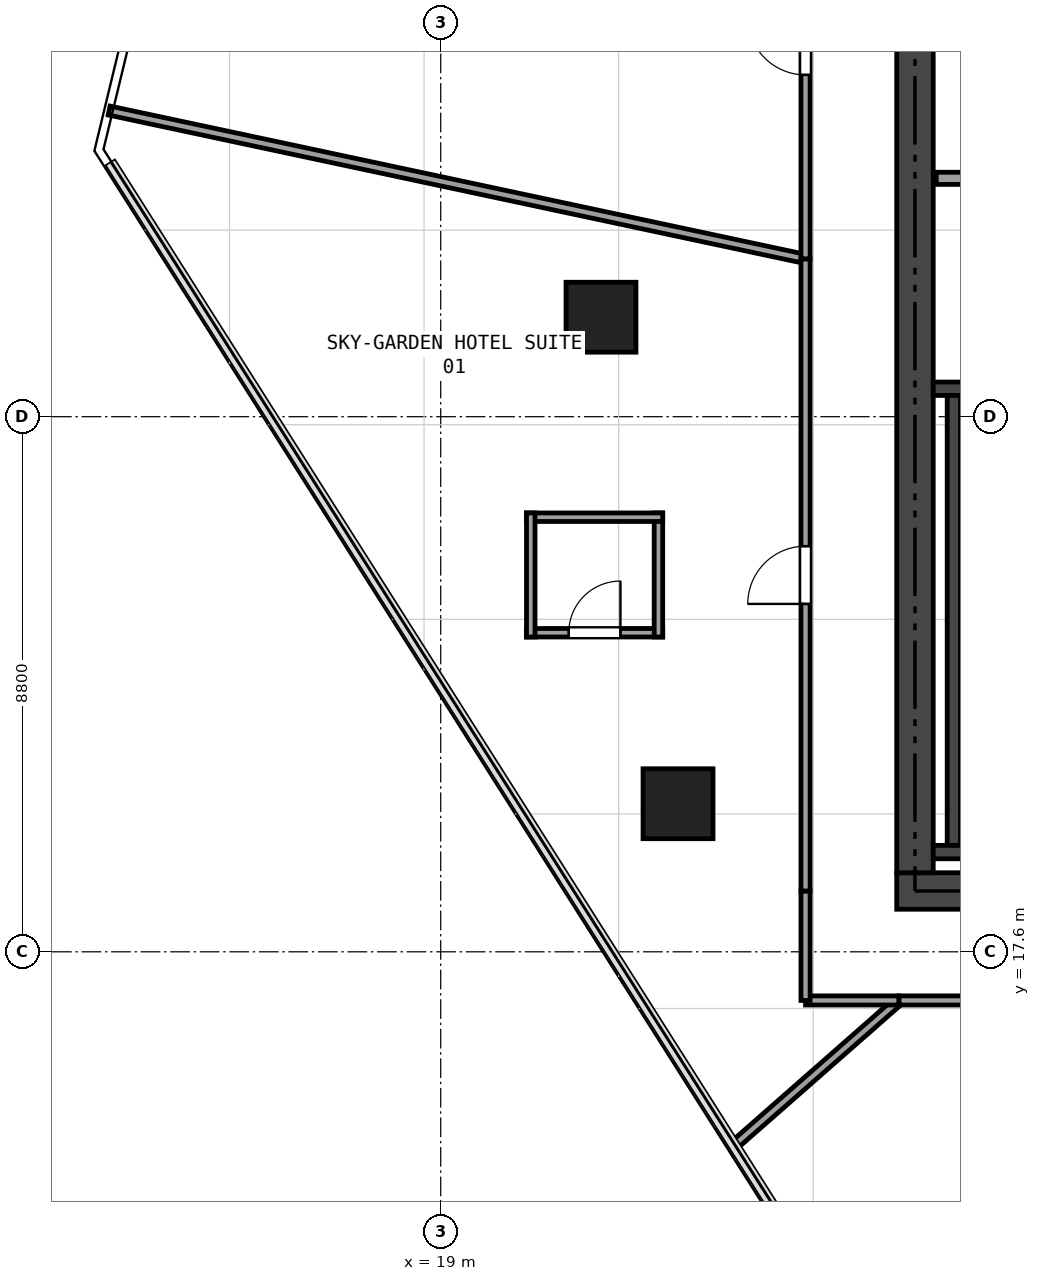
"""IFC4 building model, lengths in metres.
Left out: names, types, materials, properties, quantities, classifications, styles, units other than length and angle.
Written with IfcOpenShell. Run it as: python <this file> out.ifc"""

import sys

from ifc_helpers import new_model, si_unit, direction, frame, frame_2d, origin, origin_2d, place, context, subcontext, project, spatial, rectangle, extrude, element, fill, save


model = new_model("IFC4")
c1 = context("Model", 3, precision=1e-05, world=origin(), true_north=direction((0.0, 1.0)))
c2 = subcontext(c1, "Body", "Model", "MODEL_VIEW")
j1 = project(units=[si_unit("LENGTHUNIT", "METRE"), si_unit("PLANEANGLEUNIT", "RADIAN")], contexts=[c1])
p1 = place(None, origin())
s1 = spatial("IfcSite", under=j1, at=p1, CompositionType="ELEMENT")
p2 = place(p1, origin())
s2 = spatial("IfcBuilding", under=s1, at=p2, CompositionType="ELEMENT")
p3 = place(p2, frame((0.0, 0.0, 76.35)))
s3 = spatial("IfcBuildingStorey", under=s2, at=p3, CompositionType="ELEMENT", Elevation=76.35)
p4 = place(p3, frame((26.5, 18.6, 0.0), z_axis=(0.0, 0.0, 1.0), x_axis=(1.0, 0.0, 0.0)))
e1 = element("IfcWall", 1, at=p4, inside=s3, PredefinedType="SHEAR", context=c2, shape_type="SweptSolid", body=[
    extrude(rectangle(XDim=21.4, YDim=0.6, at=frame_2d((10.7, 0.0))), origin(), (0.0, 0.0, 1.0), 3.17),
])
p5 = place(p4, frame((12.425, 0.0, 0.0)))
e2 = element("IfcOpeningElement", 2, at=p5, cuts=e1, PredefinedType="OPENING", context=c2, shape_type="SweptSolid", body=[
    extrude(rectangle(XDim=1.15, YDim=2.15, at=frame_2d((0.575, 1.075))), frame((0.0, 0.31, 0.0), z_axis=(0.0, -1.0, 0.0), x_axis=(1.0, 0.0, 0.0)), (0.0, 0.0, 1.0), 0.62),
])
p6 = place(p4, frame((5.25, 0.0, 0.0)))
e3 = element("IfcOpeningElement", 3, at=p6, cuts=e1, PredefinedType="OPENING", context=c2, shape_type="SweptSolid", body=[
    extrude(rectangle(XDim=0.9, YDim=2.1, at=frame_2d((0.45, 1.05))), frame((0.0, 0.31, 0.0), z_axis=(0.0, -1.0, 0.0), x_axis=(1.0, 0.0, 0.0)), (0.0, 0.0, 1.0), 0.62),
])
p7 = place(p3, frame((26.8, 18.9, 0.0), z_axis=(0.0, 0.0, 1.0), x_axis=(0.0, 1.0, 0.0)))
e4 = element("IfcWall", 4, at=p7, inside=s3, PredefinedType="SHEAR", context=c2, shape_type="SweptSolid", body=[
    extrude(rectangle(XDim=15.0, YDim=0.6, at=frame_2d((7.5, 0.0))), origin(), (0.0, 0.0, 1.0), 3.17),
])
p8 = place(p3, frame((27.1, 26.86, 0.0), z_axis=(0.0, 0.0, 1.0), x_axis=(1.0, 0.0, 0.0)))
e5 = element("IfcWall", 5, at=p8, inside=s3, PredefinedType="SHEAR", context=c2, shape_type="SweptSolid", body=[
    extrude(rectangle(XDim=3.45, YDim=0.22, at=frame_2d((1.725, 0.0))), origin(), (0.0, 0.0, 1.0), 3.17),
])
p9 = place(p3, frame((27.44, 19.35, 0.0), z_axis=(0.0, 0.0, 1.0), x_axis=(0.0, 1.0, 0.0)))
e6 = element("IfcWall", 6, at=p9, inside=s3, PredefinedType="SHEAR", context=c2, shape_type="SweptSolid", body=[
    extrude(rectangle(XDim=7.4, YDim=0.22, at=frame_2d((3.7, 0.0))), origin(), (0.0, 0.0, 1.0), 3.17),
])
p10 = place(p3, frame((27.1, 19.24, 0.0), z_axis=(0.0, 0.0, 1.0), x_axis=(1.0, 0.0, 0.0)))
e7 = element("IfcWall", 7, at=p10, inside=s3, PredefinedType="SHEAR", context=c2, shape_type="SweptSolid", body=[
    extrude(rectangle(XDim=3.45, YDim=0.22, at=frame_2d((1.725, 0.0))), origin(), (0.0, 0.0, 1.0), 3.17),
])
for number, where, z_axis, x_axis in (
    (8, (21.636, 28.036, -0.405), (0.0, 0.0, 1.0), (1.0, 0.0, 0.0)),
    (9, (22.903, 20.035, -0.405), (0.0, 0.0, 1.0), (1.0, 0.0, 0.0)),
):
    element("IfcColumn", number, at=place(p3, frame(where, z_axis=z_axis, x_axis=x_axis)), inside=s3, PredefinedType="COLUMN", context=c2, shape_type="SweptSolid", body=[
        extrude(rectangle(XDim=1.15, YDim=1.15, at=origin_2d()), origin(), (0.0, 0.0, 1.0), 3.575),
    ])
p11 = place(p3, frame((27.15, 30.32, 0.0), z_axis=(0.0, 0.0, 1.0), x_axis=(1.0, 0.0, 0.0)))
e10 = element("IfcWall", 10, at=p11, inside=s3, PredefinedType="SOLIDWALL", context=c2, shape_type="SweptSolid", body=[
    extrude(rectangle(XDim=3.45, YDim=0.2, at=frame_2d((1.725, 0.0))), origin(), (0.0, 0.0, 1.0), 3.17),
])
p12 = place(p3, frame((20.411, 22.847, 0.0), z_axis=(0.0, 0.0, 1.0), x_axis=(1.0, 0.0, 0.0)))
e11 = element("IfcWall", 11, at=p12, inside=s3, PredefinedType="PARTITIONING", context=c2, shape_type="SweptSolid", body=[
    extrude(rectangle(XDim=2.24, YDim=0.14, at=frame_2d((1.12, 0.0))), origin(), (0.0, 0.0, 1.0), 2.455),
])
p13 = place(p12, frame((0.695, 0.0, 0.0)))
e12 = element("IfcOpeningElement", 12, at=p13, cuts=e11, PredefinedType="OPENING", context=c2, shape_type="SweptSolid", body=[
    extrude(rectangle(XDim=0.85, YDim=2.1, at=frame_2d((0.425, 1.05))), frame((0.0, 0.08, 0.0), z_axis=(0.0, -1.0, 0.0), x_axis=(1.0, 0.0, 0.0)), (0.0, 0.0, 1.0), 0.16),
])
p14 = place(p3, frame((22.581, 22.777, 0.0), z_axis=(0.0, 0.0, 1.0), x_axis=(0.0, 1.0, 0.0)))
e13 = element("IfcWall", 13, at=p14, inside=s3, PredefinedType="PARTITIONING", context=c2, shape_type="SweptSolid", body=[
    extrude(rectangle(XDim=2.04, YDim=0.14, at=frame_2d((1.02, 0.0))), origin(), (0.0, 0.0, 1.0), 2.455),
])
p15 = place(p3, frame((22.651, 24.747, 0.0), z_axis=(0.0, 0.0, 1.0), x_axis=(-1.0, 0.0, 0.0)))
e14 = element("IfcWall", 14, at=p15, inside=s3, PredefinedType="PARTITIONING", context=c2, shape_type="SweptSolid", body=[
    extrude(rectangle(XDim=2.24, YDim=0.14, at=frame_2d((1.12, 0.0))), origin(), (0.0, 0.0, 1.0), 2.455),
])
p16 = place(p3, frame((20.481, 24.817, 0.0), z_axis=(0.0, 0.0, 1.0), x_axis=(0.0, -1.0, 0.0)))
e15 = element("IfcWall", 15, at=p16, inside=s3, PredefinedType="PARTITIONING", context=c2, shape_type="SweptSolid", body=[
    extrude(rectangle(XDim=2.04, YDim=0.14, at=frame_2d((1.02, 0.0))), origin(), (0.0, 0.0, 1.0), 3.17),
])
p17 = place(p3, frame((13.547, 31.435, 0.0), z_axis=(0.0, 0.0, 1.0), x_axis=(0.978012740802, -0.208545148179, 0.0)))
e16 = element("IfcWall", 16, at=p17, inside=s3, PredefinedType="PARTITIONING", context=c2, shape_type="SweptSolid", body=[
    extrude(rectangle(XDim=11.71, YDim=0.15, at=frame_2d((5.855, 0.0))), origin(), (0.0, 0.0, 1.0), 2.455),
])
p18 = place(p3, frame((25.0, 28.993, 0.0), z_axis=(0.0, 0.0, 1.0), x_axis=(0.0, 1.0, 0.0)))
e17 = element("IfcWall", 17, at=p18, inside=s3, PredefinedType="PARTITIONING", context=c2, shape_type="SweptSolid", body=[
    extrude(rectangle(XDim=7.007, YDim=0.15, at=frame_2d((3.503, 0.0))), origin(), (0.0, 0.0, 1.0), 2.455),
])
p19 = place(p18, frame((3.028, 0.0, 0.0)))
e18 = element("IfcOpeningElement", 18, at=p19, cuts=e17, PredefinedType="OPENING", context=c2, shape_type="SweptSolid", body=[
    extrude(rectangle(XDim=0.95, YDim=2.15, at=frame_2d((0.475, 1.075))), frame((0.0, 0.085, 0.0), z_axis=(0.0, -1.0, 0.0), x_axis=(1.0, 0.0, 0.0)), (0.0, 0.0, 1.0), 0.17),
])
p20 = place(p3, frame((23.793, 14.391, 0.0), z_axis=(0.0, 0.0, 1.0), x_axis=(0.751631776081, 0.659582953983, 0.0)))
e19 = element("IfcWall", 19, at=p20, inside=s3, PredefinedType="PARTITIONING", context=c2, shape_type="SweptSolid", body=[
    extrude(rectangle(XDim=3.652, YDim=0.15, at=frame_2d((1.826, 0.0))), origin(), (0.0, 0.0, 1.0), 2.455),
])
p21 = place(p3, frame((26.538, 16.8, 0.0), z_axis=(0.0, 0.0, 1.0), x_axis=(-1.0, 0.0, 0.0)))
e20 = element("IfcWall", 20, at=p21, inside=s3, PredefinedType="PARTITIONING", context=c2, shape_type="SweptSolid", body=[
    extrude(rectangle(XDim=1.538, YDim=0.15, at=frame_2d((0.769, 0.0))), origin(), (0.0, 0.0, 1.0), 2.455),
])
p22 = place(p3, frame((25.0, 16.8, 0.0), z_axis=(0.0, 0.0, 1.0), x_axis=(0.0, 1.0, 0.0)))
e21 = element("IfcWall", 21, at=p22, inside=s3, PredefinedType="PARTITIONING", context=c2, shape_type="SweptSolid", body=[
    extrude(rectangle(XDim=1.8, YDim=0.15, at=frame_2d((0.9, 0.0))), origin(), (0.0, 0.0, 1.0), 2.455),
])
p23 = place(p3, frame((25.0, 18.6, 0.0), z_axis=(0.0, 0.0, 1.0), x_axis=(0.0, 1.0, 0.0)))
e22 = element("IfcWall", 22, at=p23, inside=s3, PredefinedType="PARTITIONING", context=c2, shape_type="SweptSolid", body=[
    extrude(rectangle(XDim=10.393, YDim=0.15, at=frame_2d((5.196, 0.0))), origin(), (0.0, 0.0, 1.0), 2.467),
])
p24 = place(p23, frame((4.721, 0.0, 0.0)))
e23 = element("IfcOpeningElement", 23, at=p24, cuts=e22, PredefinedType="OPENING", context=c2, shape_type="SweptSolid", body=[
    extrude(rectangle(XDim=0.95, YDim=2.15, at=frame_2d((0.475, 1.075))), frame((0.0, 0.085, 0.0), z_axis=(0.0, -1.0, 0.0), x_axis=(1.0, 0.0, 0.0)), (0.0, 0.0, 1.0), 0.17),
])
p25 = place(p3, frame((38.209, 16.8, 0.0), z_axis=(0.0, 0.0, 1.0), x_axis=(-1.0, 0.0, 0.0)))
e24 = element("IfcWall", 24, at=p25, inside=s3, PredefinedType="PARTITIONING", context=c2, shape_type="SweptSolid", body=[
    extrude(rectangle(XDim=11.671, YDim=0.15, at=frame_2d((5.835, 0.0))), origin(), (0.0, 0.0, 1.0), 2.455),
])
p26 = place(p25, frame((5.361, 0.0, 0.0)))
e25 = element("IfcOpeningElement", 25, at=p26, cuts=e24, PredefinedType="OPENING", context=c2, shape_type="SweptSolid", body=[
    extrude(rectangle(XDim=0.95, YDim=2.15, at=frame_2d((0.475, 1.075))), frame((0.0, 0.085, 0.0), z_axis=(0.0, -1.0, 0.0), x_axis=(1.0, 0.0, 0.0)), (0.0, 0.0, 1.0), 0.17),
])
p27 = place(p19, origin())
e26 = element("IfcDoor", 26, at=p27, inside=s3, OperationType="SINGLE_SWING_RIGHT", PredefinedType="DOOR", context=c2, shape_type="SweptSolid", body=[
    extrude(rectangle(XDim=0.95, YDim=2.15, at=frame_2d((0.475, 1.075))), frame((0.0, 0.025, 0.0), z_axis=(0.0, -1.0, 0.0), x_axis=(1.0, 0.0, 0.0)), (0.0, 0.0, 1.0), 0.05),
])
fill(e18, e26)
p28 = place(p24, origin())
e27 = element("IfcDoor", 27, at=p28, inside=s3, OperationType="SINGLE_SWING_LEFT", PredefinedType="DOOR", context=c2, shape_type="SweptSolid", body=[
    extrude(rectangle(XDim=0.95, YDim=2.15, at=frame_2d((0.475, 1.075))), frame((0.0, 0.025, 0.0), z_axis=(0.0, -1.0, 0.0), x_axis=(1.0, 0.0, 0.0)), (0.0, 0.0, 1.0), 0.05),
])
fill(e23, e27)
p29 = place(p13, origin())
e28 = element("IfcDoor", 28, at=p29, inside=s3, OperationType="SINGLE_SWING_RIGHT", PredefinedType="DOOR", context=c2, shape_type="SweptSolid", body=[
    extrude(rectangle(XDim=0.85, YDim=2.1, at=frame_2d((0.425, 1.05))), frame((0.0, 0.025, 0.0), z_axis=(0.0, -1.0, 0.0), x_axis=(1.0, 0.0, 0.0)), (0.0, 0.0, 1.0), 0.05),
])
fill(e12, e28)
save(model, sys.argv[1])
